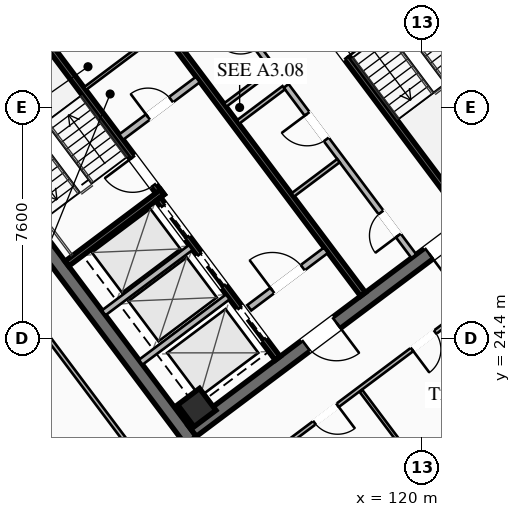
"""IFC4 building model, lengths in metres.
Left out: names, types, materials, properties, quantities, classifications, styles, units other than length and angle.
Written with IfcOpenShell. Run it as: python <this file> out.ifc"""

import sys

from ifc_helpers import new_model, si_unit, direction, frame, frame_2d, origin, origin_2d, place, context, subcontext, project, spatial, rectangle, hollow_rectangle, extrude, element, fill, save


model = new_model("IFC4")
c1 = context("Model", 3, precision=1e-05, world=origin(), true_north=direction((0.0, 1.0)))
c2 = subcontext(c1, "Body", "Model", "MODEL_VIEW")
j1 = project(units=[si_unit("LENGTHUNIT", "METRE"), si_unit("PLANEANGLEUNIT", "RADIAN")], contexts=[c1])
p1 = place(None, origin())
s1 = spatial("IfcSite", under=j1, at=p1, CompositionType="ELEMENT")
p2 = place(p1, origin())
s2 = spatial("IfcBuilding", under=s1, at=p2, CompositionType="ELEMENT")
p3 = place(p2, frame((0.0, 0.0, 243.25)))
s3 = spatial("IfcBuildingStorey", under=s2, at=p3, CompositionType="ELEMENT", Elevation=243.25)
for number, where, z_axis, x_axis in (
    (1, (112.396, 21.047, 0.0), (0.0, 0.0, 1.0), (-0.6, 0.8, 0.0)),
    (2, (115.604, 42.953, 0.0), (0.0, 0.0, 1.0), (0.6, -0.8, 0.0)),
):
    element("IfcWall", number, at=place(p3, frame(where, z_axis=z_axis, x_axis=x_axis)), inside=s3, PredefinedType="SHEAR", context=c2, shape_type="SweptSolid", body=[
        extrude(rectangle(XDim=15.6, YDim=0.45, at=frame_2d((7.8, 0.0))), origin(), (0.0, 0.0, 1.0), 3.55),
    ])
p4 = place(p3, frame((124.649, 30.518, 0.0), z_axis=(0.0, 0.0, 1.0), x_axis=(-0.8, -0.6, 0.0)))
e3 = element("IfcWall", 3, at=p4, inside=s3, PredefinedType="SHEAR", context=c2, shape_type="SweptSolid", body=[
    extrude(rectangle(XDim=15.26, YDim=0.45, at=frame_2d((7.63, 0.0))), origin(), (0.0, 0.0, 1.0), 3.55),
])
p5 = place(p4, frame((9.33, 0.0, 0.0)))
e4 = element("IfcOpeningElement", 4, at=p5, cuts=e3, PredefinedType="OPENING", context=c2, shape_type="SweptSolid", body=[
    extrude(rectangle(XDim=1.25, YDim=2.25, at=frame_2d((0.625, 1.125))), frame((0.0, 0.235, 0.0), z_axis=(0.0, -1.0, 0.0), x_axis=(1.0, 0.0, 0.0)), (0.0, 0.0, 1.0), 0.47),
])
p6 = place(p4, frame((4.28, 0.0, 0.0)))
e5 = element("IfcOpeningElement", 5, at=p6, cuts=e3, PredefinedType="OPENING", context=c2, shape_type="SweptSolid", body=[
    extrude(rectangle(XDim=1.25, YDim=2.25, at=frame_2d((0.625, 1.125))), frame((0.0, 0.235, 0.0), z_axis=(0.0, -1.0, 0.0), x_axis=(1.0, 0.0, 0.0)), (0.0, 0.0, 1.0), 0.47),
])
p7 = place(p3, frame((103.351, 33.482, 0.0), z_axis=(0.0, 0.0, 1.0), x_axis=(0.8, 0.6, 0.0)))
e6 = element("IfcWall", 6, at=p7, inside=s3, PredefinedType="SHEAR", context=c2, shape_type="SweptSolid", body=[
    extrude(rectangle(XDim=15.26, YDim=0.45, at=frame_2d((7.63, 0.0))), origin(), (0.0, 0.0, 1.0), 3.55),
])
p8 = place(p7, frame((4.68, 0.0, 0.0)))
e7 = element("IfcOpeningElement", 7, at=p8, cuts=e6, PredefinedType="OPENING", context=c2, shape_type="SweptSolid", body=[
    extrude(rectangle(XDim=1.25, YDim=2.25, at=frame_2d((0.625, 1.125))), frame((0.0, 0.235, 0.0), z_axis=(0.0, -1.0, 0.0), x_axis=(1.0, 0.0, 0.0)), (0.0, 0.0, 1.0), 0.47),
])
p9 = place(p7, frame((9.73, 0.0, 0.0)))
e8 = element("IfcOpeningElement", 8, at=p9, cuts=e6, PredefinedType="OPENING", context=c2, shape_type="SweptSolid", body=[
    extrude(rectangle(XDim=1.25, YDim=2.25, at=frame_2d((0.625, 1.125))), frame((0.0, 0.235, 0.0), z_axis=(0.0, -1.0, 0.0), x_axis=(1.0, 0.0, 0.0)), (0.0, 0.0, 1.0), 0.47),
])
p10 = place(p3, frame((112.59, 22.13, 0.0), z_axis=(0.0, 0.0, 1.0), x_axis=(0.799999996291, 0.600000004945, 0.0)))
e9 = element("IfcColumn", 9, at=p10, inside=s3, PredefinedType="COLUMN", context=c2, shape_type="SweptSolid", body=[
    extrude(hollow_rectangle(XDim=0.9, YDim=0.9, WallThickness=0.04, at=origin_2d()), origin(), (0.0, 0.0, 1.0), 3.25),
])
p11 = place(p3, frame((111.44, 29.08, 0.0), z_axis=(0.0, 0.0, 1.0), x_axis=(-0.59999041401, 0.800007189403, 0.0)))
e10 = element("IfcWall", 10, at=p11, inside=s3, PredefinedType="SHEAR", context=c2, shape_type="SweptSolid", body=[
    extrude(rectangle(XDim=8.15, YDim=0.2, at=frame_2d((4.075, 0.0))), origin(), (0.0, 0.0, 1.0), 3.25),
])
p12 = place(p11, frame((0.45, 0.0, 0.0)))
e11 = element("IfcOpeningElement", 11, at=p12, cuts=e10, PredefinedType="OPENING", context=c2, shape_type="SweptSolid", body=[
    extrude(rectangle(XDim=1.15, YDim=2.2, at=frame_2d((0.575, 1.1))), frame((0.0, 0.11, 0.0), z_axis=(0.0, -1.0, 0.0), x_axis=(1.0, 0.0, 0.0)), (0.0, 0.0, 1.0), 0.22),
])
p13 = place(p3, frame((108.316, 26.862, 0.0), z_axis=(0.0, 0.0, 1.0), x_axis=(0.800014909178, 0.599980120581, 0.0)))
e12 = element("IfcWall", 12, at=p13, inside=s3, PredefinedType="SHEAR", context=c2, shape_type="SweptSolid", body=[
    extrude(rectangle(XDim=3.93, YDim=0.2, at=frame_2d((1.965, 0.0))), origin(), (0.0, 0.0, 1.0), 3.25),
])
p14 = place(p3, frame((116.56, 34.92, 0.0), z_axis=(0.0, 0.0, 1.0), x_axis=(0.59999041401, -0.800007189403, 0.0)))
e13 = element("IfcWall", 13, at=p14, inside=s3, PredefinedType="SHEAR", context=c2, shape_type="SweptSolid", body=[
    extrude(rectangle(XDim=8.15, YDim=0.2, at=frame_2d((4.075, 0.0))), origin(), (0.0, 0.0, 1.0), 3.25),
])
p15 = place(p14, frame((0.45, 0.0, 0.0)))
e14 = element("IfcOpeningElement", 14, at=p15, cuts=e13, PredefinedType="OPENING", context=c2, shape_type="SweptSolid", body=[
    extrude(rectangle(XDim=1.15, YDim=2.2, at=frame_2d((0.575, 1.1))), frame((0.0, 0.11, 0.0), z_axis=(0.0, -1.0, 0.0), x_axis=(1.0, 0.0, 0.0)), (0.0, 0.0, 1.0), 0.22),
])
p16 = place(p3, frame((118.058, 25.856, 0.0), z_axis=(0.0, 0.0, 1.0), x_axis=(-0.600002657301, 0.799998007018, 0.0)))
e15 = element("IfcWall", 15, at=p16, inside=s3, PredefinedType="SHEAR", context=c2, shape_type="SweptSolid", body=[
    extrude(rectangle(XDim=14.7, YDim=0.2, at=frame_2d((7.35, 0.0))), origin(), (0.0, 0.0, 1.0), 3.25),
])
p17 = place(p3, frame((110.104, 31.028, 0.0), z_axis=(0.0, 0.0, 1.0), x_axis=(0.800018601094, 0.59997519774, 0.0)))
e16 = element("IfcWall", 16, at=p17, inside=s3, PredefinedType="SOLIDWALL", context=c2, shape_type="SweptSolid", body=[
    extrude(rectangle(XDim=3.15, YDim=0.22, at=frame_2d((1.575, 0.0))), origin(), (0.0, 0.0, 1.0), 2.393),
])
p18 = place(p17, frame((1.1, 0.0, 0.0)))
e17 = element("IfcOpeningElement", 17, at=p18, cuts=e16, PredefinedType="OPENING", context=c2, shape_type="SweptSolid", body=[
    extrude(rectangle(XDim=0.95, YDim=2.05, at=frame_2d((0.475, 1.025))), frame((0.0, 0.12, 0.0), z_axis=(0.0, -1.0, 0.0), x_axis=(1.0, 0.0, 0.0)), (0.0, 0.0, 1.0), 0.24),
])
p19 = place(p3, frame((114.316, 25.412, 0.0), z_axis=(0.0, 0.0, 1.0), x_axis=(0.800018601094, 0.59997519774, 0.0)))
e18 = element("IfcWall", 18, at=p19, inside=s3, PredefinedType="SOLIDWALL", context=c2, shape_type="SweptSolid", body=[
    extrude(rectangle(XDim=3.15, YDim=0.22, at=frame_2d((1.575, 0.0))), origin(), (0.0, 0.0, 1.0), 2.393),
])
p20 = place(p19, frame((0.95, 0.0, 0.0)))
e19 = element("IfcOpeningElement", 19, at=p20, cuts=e18, PredefinedType="OPENING", context=c2, shape_type="SweptSolid", body=[
    extrude(rectangle(XDim=1.25, YDim=2.25, at=frame_2d((0.625, 1.125))), frame((0.0, 0.12, 0.0), z_axis=(0.0, -1.0, 0.0), x_axis=(1.0, 0.0, 0.0)), (0.0, 0.0, 1.0), 0.24),
])
p21 = place(p3, frame((115.25, 23.75, 0.0), z_axis=(0.0, 0.0, 1.0), x_axis=(-0.599994036198, 0.800004472816, 0.0)))
e20 = element("IfcWall", 20, at=p21, inside=s3, PredefinedType="SHEAR", context=c2, shape_type="SweptSolid", body=[
    extrude(rectangle(XDim=6.55, YDim=0.2, at=frame_2d((3.275, 0.0))), origin(), (0.0, 0.0, 1.0), 3.25),
])
p22 = place(p21, frame((4.975, 0.0, 0.0)))
e21 = element("IfcOpeningElement", 21, at=p22, cuts=e20, PredefinedType="OPENING", context=c2, shape_type="SweptSolid", body=[
    extrude(rectangle(XDim=1.3, YDim=2.25, at=frame_2d((0.65, 1.125))), frame((0.0, 0.11, 0.0), z_axis=(0.0, -1.0, 0.0), x_axis=(1.0, 0.0, 0.0)), (0.0, 0.0, 1.0), 0.22),
])
p23 = place(p21, frame((2.975, 0.0, 0.0)))
e22 = element("IfcOpeningElement", 22, at=p23, cuts=e20, PredefinedType="OPENING", context=c2, shape_type="SweptSolid", body=[
    extrude(rectangle(XDim=1.3, YDim=2.25, at=frame_2d((0.65, 1.125))), frame((0.0, 0.11, 0.0), z_axis=(0.0, -1.0, 0.0), x_axis=(1.0, 0.0, 0.0)), (0.0, 0.0, 1.0), 0.22),
])
p24 = place(p21, frame((0.775, 0.0, 0.0)))
e23 = element("IfcOpeningElement", 23, at=p24, cuts=e20, PredefinedType="OPENING", context=c2, shape_type="SweptSolid", body=[
    extrude(rectangle(XDim=1.3, YDim=2.25, at=frame_2d((0.65, 1.125))), frame((0.0, 0.11, 0.0), z_axis=(0.0, -1.0, 0.0), x_axis=(1.0, 0.0, 0.0)), (0.0, 0.0, 1.0), 0.22),
])
for number, where, z_axis, x_axis in (
    (24, (110.746, 23.622, 0.0), (0.0, 0.0, 1.0), (0.8, 0.6, 0.0)),
    (25, (109.528, 25.246, 0.0), (0.0, 0.0, 1.0), (0.8, 0.6, 0.0)),
):
    element("IfcWall", number, at=place(p3, frame(where, z_axis=z_axis, x_axis=x_axis)), inside=s3, PredefinedType="SOLIDWALL", context=c2, shape_type="SweptSolid", body=[
        extrude(rectangle(XDim=3.58, YDim=0.2, at=frame_2d((1.79, 0.0))), origin(), (0.0, 0.0, 1.0), 3.25),
    ])
p25 = place(p3, frame((108.91, 32.62, 0.0), z_axis=(0.0, 0.0, 1.0), x_axis=(0.800018601094, 0.59997519774, 0.0)))
e26 = element("IfcWall", 26, at=p25, inside=s3, PredefinedType="PARTITIONING", context=c2, shape_type="SweptSolid", body=[
    extrude(rectangle(XDim=3.15, YDim=0.11, at=frame_2d((1.575, 0.0))), origin(), (0.0, 0.0, 1.0), 2.393),
])
p26 = place(p3, frame((119.73, 27.11, 0.0), z_axis=(0.0, 0.0, 1.0), x_axis=(-0.600005580459, 0.799995814625, 0.0)))
e27 = element("IfcWall", 27, at=p26, inside=s3, PredefinedType="SOLIDWALL", context=c2, shape_type="SweptSolid", body=[
    extrude(rectangle(XDim=7.0, YDim=0.2, at=frame_2d((3.5, 0.0))), origin(), (0.0, 0.0, 1.0), 2.393),
])
p27 = place(p26, frame((0.85, 0.0, 0.0)))
e28 = element("IfcOpeningElement", 28, at=p27, cuts=e27, PredefinedType="OPENING", context=c2, shape_type="SweptSolid", body=[
    extrude(rectangle(XDim=0.95, YDim=2.05, at=frame_2d((0.475, 1.025))), frame((0.0, 0.11, 0.0), z_axis=(0.0, -1.0, 0.0), x_axis=(1.0, 0.0, 0.0)), (0.0, 0.0, 1.0), 0.22),
])
p28 = place(p26, frame((4.8, 0.0, 0.0)))
e29 = element("IfcOpeningElement", 29, at=p28, cuts=e27, PredefinedType="OPENING", context=c2, shape_type="SweptSolid", body=[
    extrude(rectangle(XDim=1.05, YDim=2.2, at=frame_2d((0.525, 1.1))), frame((0.0, 0.11, 0.0), z_axis=(0.0, -1.0, 0.0), x_axis=(1.0, 0.0, 0.0)), (0.0, 0.0, 1.0), 0.22),
])
for number, where, z_axis, x_axis in (
    (30, (113.946, 31.522, 0.0), (0.0, 0.0, 1.0), (0.8, 0.6, 0.0)),
    (31, (115.746, 29.122, 0.0), (0.0, 0.0, 1.0), (0.8, 0.6, 0.0)),
):
    element("IfcWall", number, at=place(p3, frame(where, z_axis=z_axis, x_axis=x_axis)), inside=s3, PredefinedType="PARTITIONING", context=c2, shape_type="SweptSolid", body=[
        extrude(rectangle(XDim=1.88, YDim=0.135, at=frame_2d((0.94, 0.0))), origin(), (0.0, 0.0, 1.0), 2.393),
    ])
p29 = place(p3, frame((115.11, 33.27, 0.0), z_axis=(0.0, 0.0, 1.0), x_axis=(-0.600011160345, 0.79999162962, 0.0)))
e32 = element("IfcWall", 32, at=p29, inside=s3, PredefinedType="SOLIDWALL", context=c2, shape_type="SweptSolid", body=[
    extrude(rectangle(XDim=7.0, YDim=0.2, at=frame_2d((3.5, 0.0))), origin(), (0.0, 0.0, 1.0), 2.393),
])
p30 = place(p29, frame((0.85, 0.0, 0.0)))
e33 = element("IfcOpeningElement", 33, at=p30, cuts=e32, PredefinedType="OPENING", context=c2, shape_type="SweptSolid", body=[
    extrude(rectangle(XDim=0.95, YDim=2.05, at=frame_2d((0.475, 1.025))), frame((0.0, 0.11, 0.0), z_axis=(0.0, -1.0, 0.0), x_axis=(1.0, 0.0, 0.0)), (0.0, 0.0, 1.0), 0.22),
])
p31 = place(p29, frame((4.85, 0.0, 0.0)))
e34 = element("IfcOpeningElement", 34, at=p31, cuts=e32, PredefinedType="OPENING", context=c2, shape_type="SweptSolid", body=[
    extrude(rectangle(XDim=0.95, YDim=2.05, at=frame_2d((0.475, 1.025))), frame((0.0, 0.11, 0.0), z_axis=(0.0, -1.0, 0.0), x_axis=(1.0, 0.0, 0.0)), (0.0, 0.0, 1.0), 0.22),
])
p32 = place(p3, frame((113.526, 32.082, 0.0), z_axis=(0.0, 0.0, 1.0), x_axis=(0.800046745961, 0.599937666993, 0.0)))
e35 = element("IfcWall", 35, at=p32, inside=s3, PredefinedType="PARTITIONING", context=c2, shape_type="SweptSolid", body=[
    extrude(rectangle(XDim=1.88, YDim=0.135, at=frame_2d((0.94, 0.0))), origin(), (0.0, 0.0, 1.0), 2.393),
])
p33 = place(p3, frame((123.382, 26.824, 0.0), z_axis=(0.0, 0.0, 1.0), x_axis=(-0.800004191227, -0.599994411657, 0.0)))
e36 = element("IfcWall", 36, at=p33, inside=s3, PredefinedType="PARTITIONING", context=c2, shape_type="SweptSolid", body=[
    extrude(rectangle(XDim=13.98, YDim=0.135, at=frame_2d((6.99, 0.0))), origin(), (0.0, 0.0, 1.0), 2.393),
])
p34 = place(p33, frame((7.701, 0.0, 0.0)))
e37 = element("IfcOpeningElement", 37, at=p34, cuts=e36, PredefinedType="OPENING", context=c2, shape_type="SweptSolid", body=[
    extrude(rectangle(XDim=0.95, YDim=2.05, at=frame_2d((0.475, 1.025))), frame((0.0, 0.077, 0.0), z_axis=(0.0, -1.0, 0.0), x_axis=(1.0, 0.0, 0.0)), (0.0, 0.0, 1.0), 0.155),
])
p35 = place(p33, frame((3.688, 0.0, 0.0)))
e38 = element("IfcOpeningElement", 38, at=p35, cuts=e36, PredefinedType="OPENING", context=c2, shape_type="SweptSolid", body=[
    extrude(rectangle(XDim=0.95, YDim=2.05, at=frame_2d((0.475, 1.025))), frame((0.0, 0.077, 0.0), z_axis=(0.0, -1.0, 0.0), x_axis=(1.0, 0.0, 0.0)), (0.0, 0.0, 1.0), 0.155),
])
p36 = place(p3, frame((121.008, 18.656, 0.0), z_axis=(0.0, 0.0, 1.0), x_axis=(-0.600015531756, 0.799988350947, 0.0)))
e39 = element("IfcWall", 39, at=p36, inside=s3, PredefinedType="PARTITIONING", context=c2, shape_type="SweptSolid", body=[
    extrude(rectangle(XDim=5.03, YDim=0.11, at=frame_2d((2.515, 0.0))), origin(), (0.0, 0.0, 1.0), 2.393),
])
p37 = place(p3, frame((112.15, 18.5, 0.0), z_axis=(0.0, 0.0, 1.0), x_axis=(-0.599998104681, 0.800001421485, 0.0)))
e40 = element("IfcWall", 40, at=p37, inside=s3, PredefinedType="PARTITIONING", context=c2, shape_type="SweptSolid", body=[
    extrude(rectangle(XDim=20.61, YDim=0.135, at=frame_2d((10.305, 0.0))), origin(), (0.0, 0.0, 1.0), 2.393),
])
p38 = place(p37, frame((19.36, 0.0, 0.0)))
e41 = element("IfcOpeningElement", 41, at=p38, cuts=e40, PredefinedType="OPENING", context=c2, shape_type="SweptSolid", body=[
    extrude(rectangle(XDim=0.95, YDim=2.05, at=frame_2d((0.475, 1.025))), frame((0.0, 0.077, 0.0), z_axis=(0.0, -1.0, 0.0), x_axis=(1.0, 0.0, 0.0)), (0.0, 0.0, 1.0), 0.155),
])
p39 = place(p5, origin())
e42 = element("IfcDoor", 42, at=p39, inside=s3, OperationType="SINGLE_SWING_LEFT", PredefinedType="DOOR", context=c2, shape_type="SweptSolid", body=[
    extrude(rectangle(XDim=1.25, YDim=2.25, at=frame_2d((0.625, 1.125))), frame((0.0, 0.025, 0.0), z_axis=(0.0, -1.0, 0.0), x_axis=(1.0, 0.0, 0.0)), (0.0, 0.0, 1.0), 0.05),
])
fill(e4, e42)
p40 = place(p6, origin())
e43 = element("IfcDoor", 43, at=p40, inside=s3, OperationType="SINGLE_SWING_RIGHT", PredefinedType="DOOR", context=c2, shape_type="SweptSolid", body=[
    extrude(rectangle(XDim=1.25, YDim=2.25, at=frame_2d((0.625, 1.125))), frame((0.0, 0.025, 0.0), z_axis=(0.0, -1.0, 0.0), x_axis=(1.0, 0.0, 0.0)), (0.0, 0.0, 1.0), 0.05),
])
fill(e5, e43)
p41 = place(p12, origin())
e44 = element("IfcDoor", 44, at=p41, inside=s3, OperationType="SINGLE_SWING_RIGHT", PredefinedType="DOOR", context=c2, shape_type="SweptSolid", body=[
    extrude(rectangle(XDim=1.15, YDim=2.2, at=frame_2d((0.575, 1.1))), frame((0.0, 0.025, 0.0), z_axis=(0.0, -1.0, 0.0), x_axis=(1.0, 0.0, 0.0)), (0.0, 0.0, 1.0), 0.05),
])
fill(e11, e44)
p42 = place(p15, origin())
e45 = element("IfcDoor", 45, at=p42, inside=s3, OperationType="SINGLE_SWING_RIGHT", PredefinedType="DOOR", context=c2, shape_type="SweptSolid", body=[
    extrude(rectangle(XDim=1.15, YDim=2.2, at=frame_2d((0.575, 1.1))), frame((0.0, 0.025, 0.0), z_axis=(0.0, -1.0, 0.0), x_axis=(1.0, 0.0, 0.0)), (0.0, 0.0, 1.0), 0.05),
])
fill(e14, e45)
p43 = place(p20, origin())
e46 = element("IfcDoor", 46, at=p43, inside=s3, OperationType="SINGLE_SWING_LEFT", PredefinedType="DOOR", context=c2, shape_type="SweptSolid", body=[
    extrude(rectangle(XDim=1.25, YDim=2.25, at=frame_2d((0.625, 1.125))), frame((0.0, 0.025, 0.0), z_axis=(0.0, -1.0, 0.0), x_axis=(1.0, 0.0, 0.0)), (0.0, 0.0, 1.0), 0.05),
])
fill(e19, e46)
p44 = place(p18, origin())
e47 = element("IfcDoor", 47, at=p44, inside=s3, OperationType="SINGLE_SWING_LEFT", PredefinedType="DOOR", context=c2, shape_type="SweptSolid", body=[
    extrude(rectangle(XDim=0.95, YDim=2.05, at=frame_2d((0.475, 1.025))), frame((0.0, 0.025, 0.0), z_axis=(0.0, -1.0, 0.0), x_axis=(1.0, 0.0, 0.0)), (0.0, 0.0, 1.0), 0.05),
])
fill(e17, e47)
p45 = place(p27, origin())
e48 = element("IfcDoor", 48, at=p45, inside=s3, OperationType="SINGLE_SWING_LEFT", PredefinedType="DOOR", context=c2, shape_type="SweptSolid", body=[
    extrude(rectangle(XDim=0.95, YDim=2.05, at=frame_2d((0.475, 1.025))), frame((0.0, 0.025, 0.0), z_axis=(0.0, -1.0, 0.0), x_axis=(1.0, 0.0, 0.0)), (0.0, 0.0, 1.0), 0.05),
])
fill(e28, e48)
p46 = place(p28, origin())
e49 = element("IfcDoor", 49, at=p46, inside=s3, OperationType="SINGLE_SWING_RIGHT", PredefinedType="DOOR", context=c2, shape_type="SweptSolid", body=[
    extrude(rectangle(XDim=1.05, YDim=2.2, at=frame_2d((0.525, 1.1))), frame((0.0, 0.025, 0.0), z_axis=(0.0, -1.0, 0.0), x_axis=(1.0, 0.0, 0.0)), (0.0, 0.0, 1.0), 0.05),
])
fill(e29, e49)
p47 = place(p34, origin())
e50 = element("IfcDoor", 50, at=p47, inside=s3, OperationType="SINGLE_SWING_LEFT", PredefinedType="DOOR", context=c2, shape_type="SweptSolid", body=[
    extrude(rectangle(XDim=0.95, YDim=2.05, at=frame_2d((0.475, 1.025))), frame((0.0, 0.025, 0.0), z_axis=(0.0, -1.0, 0.0), x_axis=(1.0, 0.0, 0.0)), (0.0, 0.0, 1.0), 0.05),
])
fill(e37, e50)
p48 = place(p35, origin())
e51 = element("IfcDoor", 51, at=p48, inside=s3, OperationType="SINGLE_SWING_RIGHT", PredefinedType="DOOR", context=c2, shape_type="SweptSolid", body=[
    extrude(rectangle(XDim=0.95, YDim=2.05, at=frame_2d((0.475, 1.025))), frame((0.0, 0.025, 0.0), z_axis=(0.0, -1.0, 0.0), x_axis=(1.0, 0.0, 0.0)), (0.0, 0.0, 1.0), 0.05),
])
fill(e38, e51)
p49 = place(p22, origin())
e52 = element("IfcDoor", 52, at=p49, inside=s3, OperationType="SLIDING_TO_LEFT", PredefinedType="DOOR", context=c2, shape_type="SweptSolid", body=[
    extrude(rectangle(XDim=1.3, YDim=2.25, at=frame_2d((0.65, 1.125))), frame((0.0, 0.025, 0.0), z_axis=(0.0, -1.0, 0.0), x_axis=(1.0, 0.0, 0.0)), (0.0, 0.0, 1.0), 0.05),
])
fill(e21, e52)
p50 = place(p23, origin())
e53 = element("IfcDoor", 53, at=p50, inside=s3, OperationType="SLIDING_TO_LEFT", PredefinedType="DOOR", context=c2, shape_type="SweptSolid", body=[
    extrude(rectangle(XDim=1.3, YDim=2.25, at=frame_2d((0.65, 1.125))), frame((0.0, 0.025, 0.0), z_axis=(0.0, -1.0, 0.0), x_axis=(1.0, 0.0, 0.0)), (0.0, 0.0, 1.0), 0.05),
])
fill(e22, e53)
p51 = place(p24, origin())
e54 = element("IfcDoor", 54, at=p51, inside=s3, OperationType="SLIDING_TO_LEFT", PredefinedType="DOOR", context=c2, shape_type="SweptSolid", body=[
    extrude(rectangle(XDim=1.3, YDim=2.25, at=frame_2d((0.65, 1.125))), frame((0.0, 0.025, 0.0), z_axis=(0.0, -1.0, 0.0), x_axis=(1.0, 0.0, 0.0)), (0.0, 0.0, 1.0), 0.05),
])
fill(e23, e54)
save(model, sys.argv[1])
